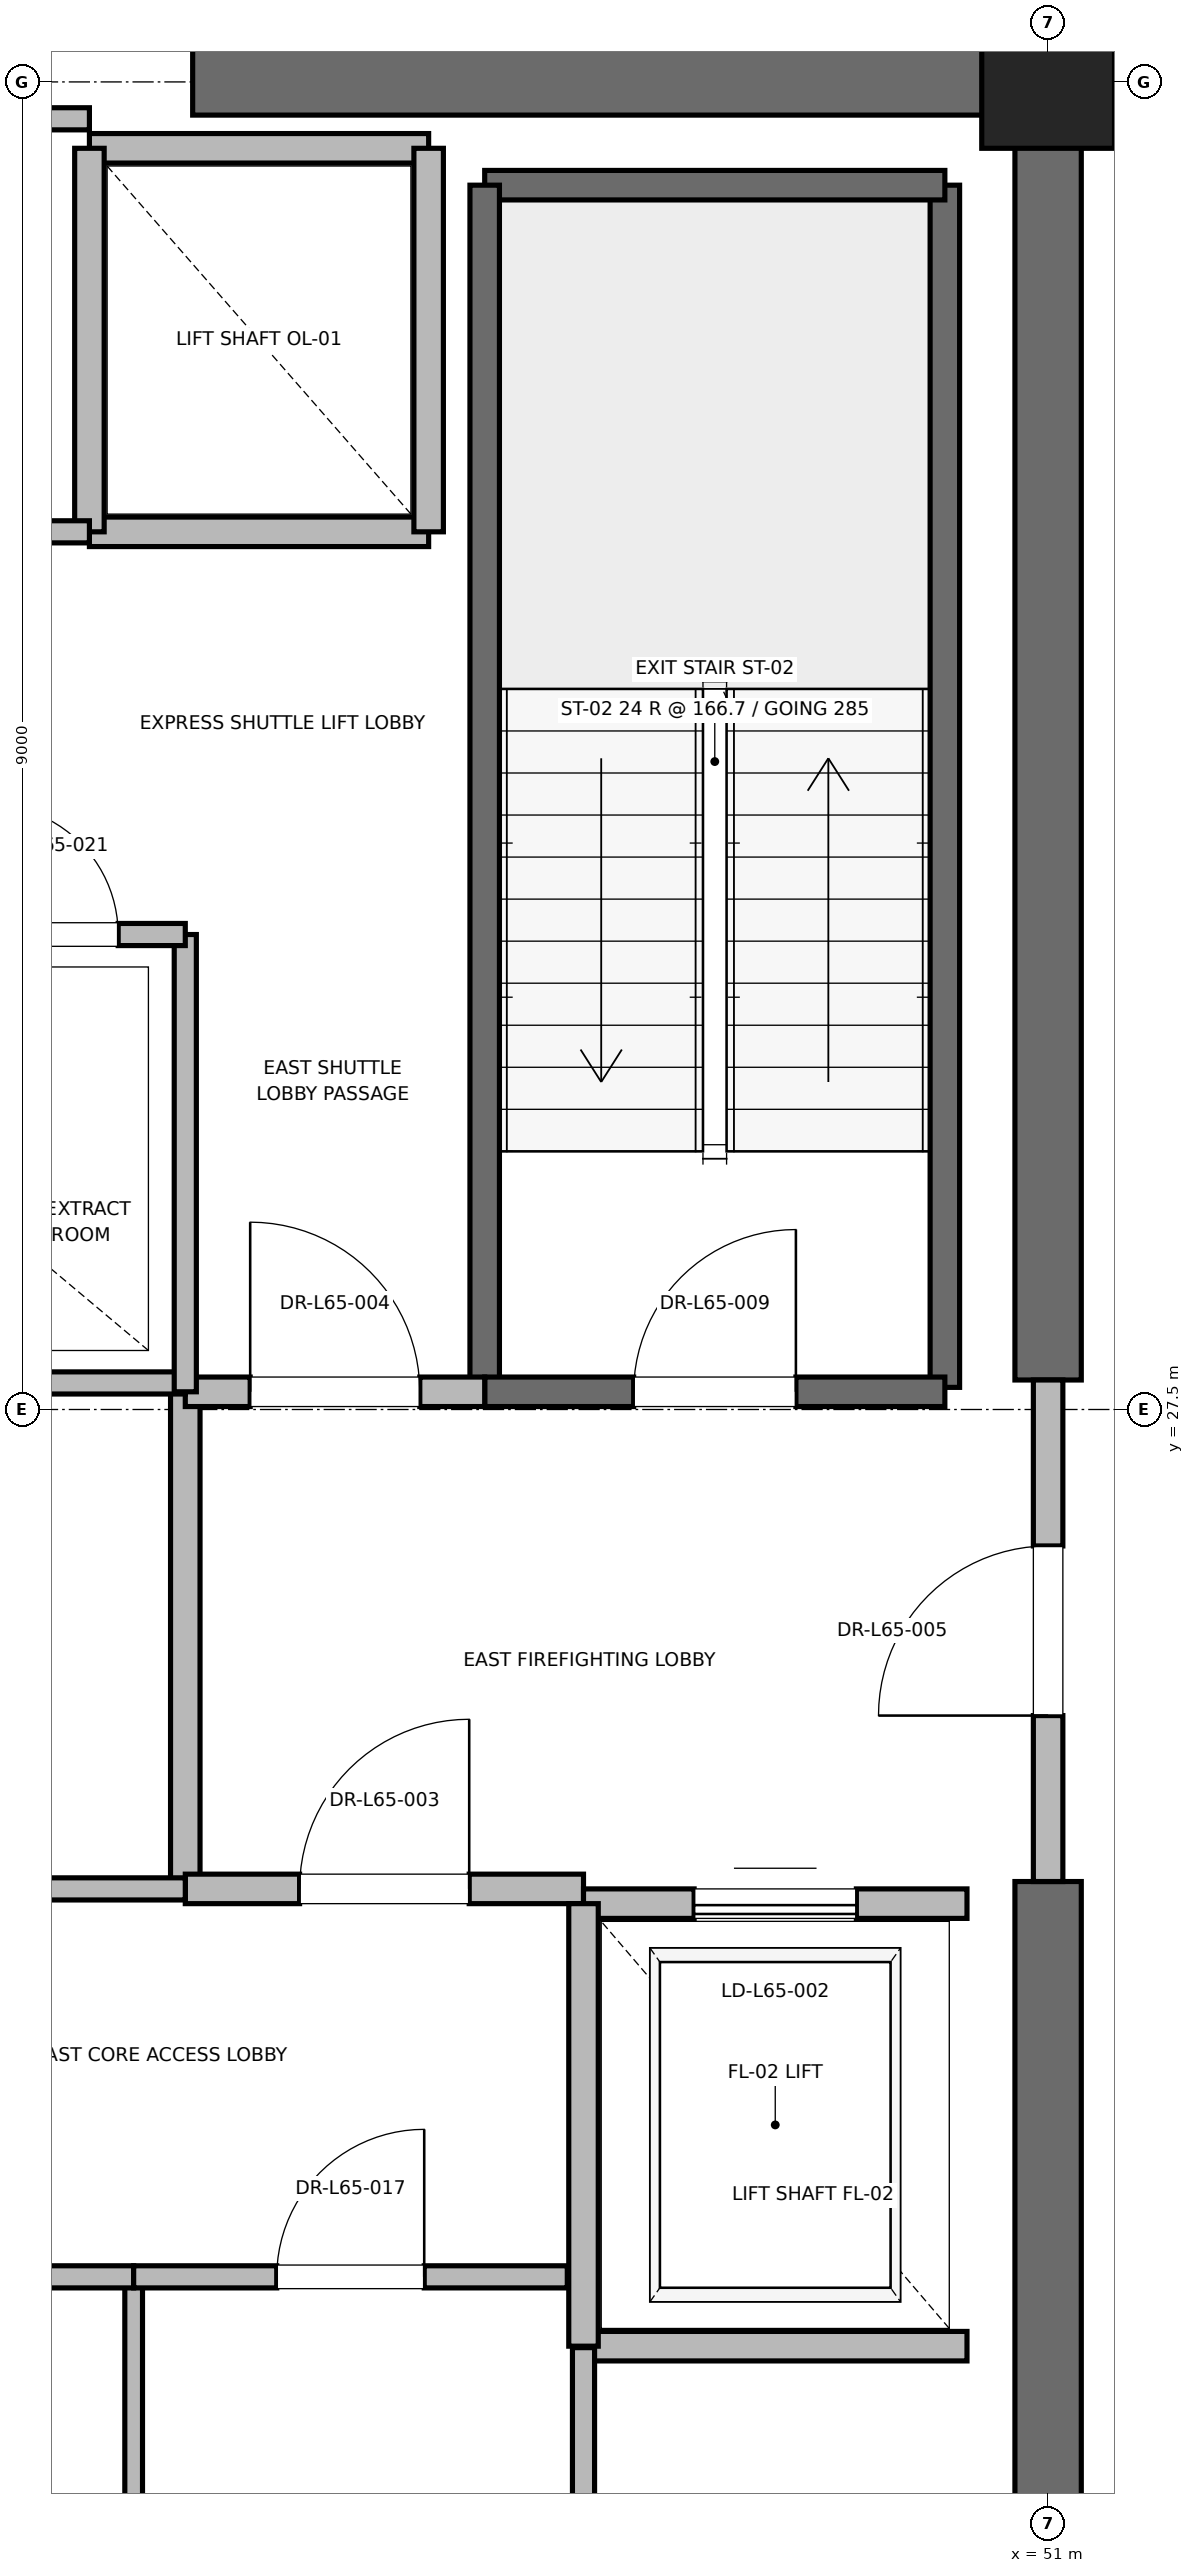
"""IFC4 building model, lengths in metres.
Left out: names, types, materials, properties, quantities, classifications, styles, units other than length and angle.
Written with IfcOpenShell. Run it as: python <this file> out.ifc"""

import sys

from ifc_helpers import new_model, si_unit, direction, frame, frame_2d, origin, origin_2d, place, context, subcontext, project, spatial, rectangle, extrude, element, fill, save


model = new_model("IFC4")
c1 = context("Model", 3, precision=1e-05, world=origin(), true_north=direction((0.0, 1.0)))
c2 = subcontext(c1, "Body", "Model", "MODEL_VIEW")
j1 = project(units=[si_unit("LENGTHUNIT", "METRE"), si_unit("PLANEANGLEUNIT", "RADIAN")], contexts=[c1])
p1 = place(None, origin())
s1 = spatial("IfcSite", under=j1, at=p1, CompositionType="ELEMENT")
p2 = place(p1, origin())
s2 = spatial("IfcBuilding", under=s1, at=p2, CompositionType="ELEMENT")
p3 = place(p2, frame((0.0, 0.0, 279.2)))
s3 = spatial("IfcBuildingStorey", under=s2, at=p3, CompositionType="ELEMENT", Elevation=279.2)
p4 = place(p3, frame((51.0, 36.5, 0.0), z_axis=(0.0, 0.0, 1.0), x_axis=(1.0, 0.0, 0.0)))
e1 = element("IfcColumn", 1, at=p4, inside=s3, PredefinedType="PILASTER", context=c2, shape_type="SweptSolid", body=[
    extrude(rectangle(XDim=0.9, YDim=0.9, at=origin_2d()), origin(), (0.0, 0.0, 1.0), 4.0),
])
for number, where, z_axis, x_axis in (
    (2, (45.2, 36.5, 0.0), (0.0, 0.0, 1.0), (1.0, 0.0, 0.0)),
    (3, (51.0, 18.5, 0.0), (0.0, 0.0, 1.0), (0.0, 1.0, 0.0)),
):
    element("IfcWall", number, at=place(p3, frame(where, z_axis=z_axis, x_axis=x_axis)), inside=s3, PredefinedType="SHEAR", context=c2, shape_type="SweptSolid", body=[
        extrude(rectangle(XDim=5.8, YDim=0.45, at=frame_2d((2.9, 0.0))), origin(), (0.0, 0.0, 1.0), 3.785),
    ])
p5 = place(p3, frame((51.0, 27.7, 0.0), z_axis=(0.0, 0.0, 1.0), x_axis=(0.0, 1.0, 0.0)))
e4 = element("IfcWall", 4, at=p5, inside=s3, PredefinedType="SHEAR", context=c2, shape_type="SweptSolid", body=[
    extrude(rectangle(XDim=8.8, YDim=0.45, at=frame_2d((4.4, 0.0))), origin(), (0.0, 0.0, 1.0), 3.785),
])
p6 = place(p3, frame((50.3, 27.65, 0.0), z_axis=(0.0, 0.0, 1.0), x_axis=(0.0, 1.0, 0.0)))
e5 = element("IfcWall", 5, at=p6, inside=s3, PredefinedType="SOLIDWALL", context=c2, shape_type="SweptSolid", body=[
    extrude(rectangle(XDim=8.15, YDim=0.2, at=frame_2d((4.075, 0.0))), origin(), (0.0, 0.0, 1.0), 3.785),
])
p7 = place(p3, frame((47.18, 35.8, 0.0), z_axis=(0.0, 0.0, 1.0), x_axis=(1.0, 0.0, 0.0)))
e6 = element("IfcWall", 6, at=p7, inside=s3, PredefinedType="SOLIDWALL", context=c2, shape_type="SweptSolid", body=[
    extrude(rectangle(XDim=3.12, YDim=0.2, at=frame_2d((1.56, 0.0))), origin(), (0.0, 0.0, 1.0), 3.785),
])
p8 = place(p3, frame((47.18, 27.62, 0.0), z_axis=(0.0, 0.0, 1.0), x_axis=(0.0, 1.0, 0.0)))
e7 = element("IfcWall", 7, at=p8, inside=s3, PredefinedType="SOLIDWALL", context=c2, shape_type="SweptSolid", body=[
    extrude(rectangle(XDim=8.18, YDim=0.2, at=frame_2d((4.09, 0.0))), origin(), (0.0, 0.0, 1.0), 3.785),
])
p9 = place(p3, frame((47.18, 27.62, 0.0), z_axis=(0.0, 0.0, 1.0), x_axis=(1.0, 0.0, 0.0)))
e8 = element("IfcWall", 8, at=p9, inside=s3, PredefinedType="SOLIDWALL", context=c2, shape_type="SweptSolid", body=[
    extrude(rectangle(XDim=3.12, YDim=0.2, at=frame_2d((1.56, 0.0))), origin(), (0.0, 0.0, 1.0), 3.785),
])
p10 = place(p9, frame((1.01, 0.0, 0.0)))
e9 = element("IfcOpeningElement", 9, at=p10, cuts=e8, PredefinedType="OPENING", context=c2, shape_type="SweptSolid", body=[
    extrude(rectangle(XDim=1.1, YDim=2.15, at=frame_2d((0.55, 1.075))), frame((0.0, 0.1, 0.0), z_axis=(0.0, -1.0, 0.0), x_axis=(1.0, 0.0, 0.0)), (0.0, 0.0, 1.0), 0.2),
])
p11 = place(p3, frame((45.15, 24.25, 0.0), z_axis=(0.0, 0.0, 1.0), x_axis=(0.0, 1.0, 0.0)))
e10 = element("IfcWall", 10, at=p11, inside=s3, PredefinedType="PARTITIONING", context=c2, shape_type="SweptSolid", body=[
    extrude(rectangle(XDim=3.37, YDim=0.2, at=frame_2d((1.685, 0.0))), origin(), (0.0, 0.0, 1.0), 3.785),
])
p12 = place(p3, frame((45.15, 24.25, 0.0), z_axis=(0.0, 0.0, 1.0), x_axis=(1.0, 0.0, 0.0)))
e11 = element("IfcWall", 11, at=p12, inside=s3, PredefinedType="PARTITIONING", context=c2, shape_type="SweptSolid", body=[
    extrude(rectangle(XDim=2.7, YDim=0.2, at=frame_2d((1.35, 0.0))), origin(), (0.0, 0.0, 1.0), 3.785),
])
p13 = place(p12, frame((0.775, 0.0, 0.0)))
e12 = element("IfcOpeningElement", 12, at=p13, cuts=e11, PredefinedType="OPENING", context=c2, shape_type="SweptSolid", body=[
    extrude(rectangle(XDim=1.15, YDim=2.2, at=frame_2d((0.575, 1.1))), frame((0.0, 0.1, 0.0), z_axis=(0.0, -1.0, 0.0), x_axis=(1.0, 0.0, 0.0)), (0.0, 0.0, 1.0), 0.2),
])
p14 = place(p3, frame((45.15, 27.62, 0.0), z_axis=(0.0, 0.0, 1.0), x_axis=(1.0, 0.0, 0.0)))
e13 = element("IfcWall", 13, at=p14, inside=s3, PredefinedType="PARTITIONING", context=c2, shape_type="SweptSolid", body=[
    extrude(rectangle(XDim=2.03, YDim=0.2, at=frame_2d((1.015, 0.0))), origin(), (0.0, 0.0, 1.0), 3.785),
])
p15 = place(p14, frame((0.44, 0.0, 0.0)))
e14 = element("IfcOpeningElement", 14, at=p15, cuts=e13, PredefinedType="OPENING", context=c2, shape_type="SweptSolid", body=[
    extrude(rectangle(XDim=1.15, YDim=2.2, at=frame_2d((0.575, 1.1))), frame((0.0, 0.1, 0.0), z_axis=(0.0, -1.0, 0.0), x_axis=(1.0, 0.0, 0.0)), (0.0, 0.0, 1.0), 0.2),
])
p16 = place(p3, frame((51.0, 24.3, 0.0), z_axis=(0.0, 0.0, 1.0), x_axis=(0.0, 1.0, 0.0)))
e15 = element("IfcWall", 15, at=p16, inside=s3, PredefinedType="PARTITIONING", context=c2, shape_type="SweptSolid", body=[
    extrude(rectangle(XDim=3.4, YDim=0.2, at=frame_2d((1.7, 0.0))), origin(), (0.0, 0.0, 1.0), 2.865),
])
p17 = place(p16, frame((1.125, 0.0, 0.0)))
e16 = element("IfcOpeningElement", 16, at=p17, cuts=e15, PredefinedType="OPENING", context=c2, shape_type="SweptSolid", body=[
    extrude(rectangle(XDim=1.15, YDim=2.2, at=frame_2d((0.575, 1.1))), frame((0.0, 0.1, 0.0), z_axis=(0.0, -1.0, 0.0), x_axis=(1.0, 0.0, 0.0)), (0.0, 0.0, 1.0), 0.2),
])
p18 = place(p3, frame((47.85, 21.15, 0.0), z_axis=(0.0, 0.0, 1.0), x_axis=(1.0, 0.0, 0.0)))
e17 = element("IfcWall", 17, at=p18, inside=s3, PredefinedType="SOLIDWALL", context=c2, shape_type="SweptSolid", body=[
    extrude(rectangle(XDim=2.6, YDim=0.2, at=frame_2d((1.3, 0.0))), origin(), (0.0, 0.0, 1.0), 3.785),
])
p19 = place(p3, frame((50.45, 24.15, 0.0), z_axis=(0.0, 0.0, 1.0), x_axis=(-1.0, 0.0, 0.0)))
e18 = element("IfcWall", 18, at=p19, inside=s3, PredefinedType="SOLIDWALL", context=c2, shape_type="SweptSolid", body=[
    extrude(rectangle(XDim=2.6, YDim=0.2, at=frame_2d((1.3, 0.0))), origin(), (0.0, 0.0, 1.0), 2.865),
])
p20 = place(p19, frame((0.75, 0.0, 0.0)))
e19 = element("IfcOpeningElement", 19, at=p20, cuts=e18, PredefinedType="OPENING", context=c2, shape_type="SweptSolid", body=[
    extrude(rectangle(XDim=1.1, YDim=2.2, at=frame_2d((0.55, 1.1))), frame((0.0, 0.1, 0.0), z_axis=(0.0, -1.0, 0.0), x_axis=(1.0, 0.0, 0.0)), (0.0, 0.0, 1.0), 0.2),
])
p21 = place(p3, frame((47.85, 24.15, 0.0), z_axis=(0.0, 0.0, 1.0), x_axis=(0.0, -1.0, 0.0)))
e20 = element("IfcWall", 20, at=p21, inside=s3, PredefinedType="SOLIDWALL", context=c2, shape_type="SweptSolid", body=[
    extrude(rectangle(XDim=3.0, YDim=0.2, at=frame_2d((1.5, 0.0))), origin(), (0.0, 0.0, 1.0), 3.785),
])
p22 = place(p3, frame((44.5, 33.45, 0.0), z_axis=(0.0, 0.0, 1.0), x_axis=(1.0, 0.0, 0.0)))
e21 = element("IfcWall", 21, at=p22, inside=s3, PredefinedType="SOLIDWALL", context=c2, shape_type="SweptSolid", body=[
    extrude(rectangle(XDim=2.3, YDim=0.2, at=frame_2d((1.15, 0.0))), origin(), (0.0, 0.0, 1.0), 3.785),
])
p23 = place(p3, frame((46.8, 36.05, 0.0), z_axis=(0.0, 0.0, 1.0), x_axis=(-1.0, 0.0, 0.0)))
e22 = element("IfcWall", 22, at=p23, inside=s3, PredefinedType="SOLIDWALL", context=c2, shape_type="SweptSolid", body=[
    extrude(rectangle(XDim=2.3, YDim=0.2, at=frame_2d((1.15, 0.0))), origin(), (0.0, 0.0, 1.0), 2.865),
])
p24 = place(p3, frame((44.5, 36.05, 0.0), z_axis=(0.0, 0.0, 1.0), x_axis=(0.0, -1.0, 0.0)))
e23 = element("IfcWall", 23, at=p24, inside=s3, PredefinedType="SOLIDWALL", context=c2, shape_type="SweptSolid", body=[
    extrude(rectangle(XDim=2.6, YDim=0.2, at=frame_2d((1.3, 0.0))), origin(), (0.0, 0.0, 1.0), 2.865),
])
p25 = place(p3, frame((46.8, 33.45, 0.0), z_axis=(0.0, 0.0, 1.0), x_axis=(0.0, 1.0, 0.0)))
e24 = element("IfcWall", 24, at=p25, inside=s3, PredefinedType="SOLIDWALL", context=c2, shape_type="SweptSolid", body=[
    extrude(rectangle(XDim=2.6, YDim=0.2, at=frame_2d((1.3, 0.0))), origin(), (0.0, 0.0, 1.0), 3.785),
])
p26 = place(p3, frame((41.56, 27.68, 0.0), z_axis=(0.0, 0.0, 1.0), x_axis=(1.0, 0.0, 0.0)))
e25 = element("IfcWall", 25, at=p26, inside=s3, PredefinedType="PARTITIONING", context=c2, shape_type="SweptSolid", body=[
    extrude(rectangle(XDim=3.59, YDim=0.15, at=frame_2d((1.795, 0.0))), origin(), (0.0, 0.0, 1.0), 2.85),
])
p27 = place(p3, frame((47.85, 18.6, 0.0), z_axis=(0.0, 0.0, 1.0), x_axis=(0.0, 1.0, 0.0)))
e26 = element("IfcWall", 26, at=p27, inside=s3, PredefinedType="PARTITIONING", context=c2, shape_type="SweptSolid", body=[
    extrude(rectangle(XDim=2.54, YDim=0.15, at=frame_2d((1.27, 0.0))), origin(), (0.0, 0.0, 1.0), 2.85),
])
p28 = place(p3, frame((44.8, 18.6, 0.0), z_axis=(0.0, 0.0, 1.0), x_axis=(0.0, 1.0, 0.0)))
e27 = element("IfcWall", 27, at=p28, inside=s3, PredefinedType="PARTITIONING", context=c2, shape_type="SweptSolid", body=[
    extrude(rectangle(XDim=3.02, YDim=0.12, at=frame_2d((1.51, 0.0))), origin(), (0.0, 0.0, 1.0), 2.85),
])
p29 = place(p3, frame((41.76, 21.62, 0.0), z_axis=(0.0, 0.0, 1.0), x_axis=(1.0, 0.0, 0.0)))
e28 = element("IfcWall", 28, at=p29, inside=s3, PredefinedType="PARTITIONING", context=c2, shape_type="SweptSolid", body=[
    extrude(rectangle(XDim=3.04, YDim=0.15, at=frame_2d((1.52, 0.0))), origin(), (0.0, 0.0, 1.0), 2.85),
])
p30 = place(p29, frame((1.02, 0.0, 0.0)))
e29 = element("IfcOpeningElement", 29, at=p30, cuts=e28, PredefinedType="OPENING", context=c2, shape_type="SweptSolid", body=[
    extrude(rectangle(XDim=1.0, YDim=2.15, at=frame_2d((0.5, 1.075))), frame((0.0, 0.075, 0.0), z_axis=(0.0, -1.0, 0.0), x_axis=(1.0, 0.0, 0.0)), (0.0, 0.0, 1.0), 0.15),
])
p31 = place(p3, frame((44.8, 21.62, 0.0), z_axis=(0.0, 0.0, 1.0), x_axis=(1.0, 0.0, 0.0)))
e30 = element("IfcWall", 30, at=p31, inside=s3, PredefinedType="PARTITIONING", context=c2, shape_type="SweptSolid", body=[
    extrude(rectangle(XDim=2.94, YDim=0.15, at=frame_2d((1.47, 0.0))), origin(), (0.0, 0.0, 1.0), 2.85),
])
p32 = place(p31, frame((0.97, 0.0, 0.0)))
e31 = element("IfcOpeningElement", 31, at=p32, cuts=e30, PredefinedType="OPENING", context=c2, shape_type="SweptSolid", body=[
    extrude(rectangle(XDim=1.0, YDim=2.15, at=frame_2d((0.5, 1.075))), frame((0.0, 0.075, 0.0), z_axis=(0.0, -1.0, 0.0), x_axis=(1.0, 0.0, 0.0)), (0.0, 0.0, 1.0), 0.15),
])
p33 = place(p3, frame((41.76, 24.25, 0.0), z_axis=(0.0, 0.0, 1.0), x_axis=(1.0, 0.0, 0.0)))
e32 = element("IfcWall", 32, at=p33, inside=s3, PredefinedType="PARTITIONING", context=c2, shape_type="SweptSolid", body=[
    extrude(rectangle(XDim=3.39, YDim=0.15, at=frame_2d((1.695, 0.0))), origin(), (0.0, 0.0, 1.0), 2.85),
])
p34 = place(p33, frame((1.255, 0.0, 0.0)))
e33 = element("IfcOpeningElement", 33, at=p34, cuts=e32, PredefinedType="OPENING", context=c2, shape_type="SweptSolid", body=[
    extrude(rectangle(XDim=0.88, YDim=2.1, at=frame_2d((0.44, 1.05))), frame((0.0, 0.075, 0.0), z_axis=(0.0, -1.0, 0.0), x_axis=(1.0, 0.0, 0.0)), (0.0, 0.0, 1.0), 0.15),
])
p35 = place(p3, frame((45.15, 27.62, 0.0), z_axis=(0.0, 0.0, 1.0), x_axis=(0.0, 1.0, 0.0)))
e34 = element("IfcWall", 34, at=p35, inside=s3, PredefinedType="PARTITIONING", context=c2, shape_type="SweptSolid", body=[
    extrude(rectangle(XDim=3.1, YDim=0.15, at=frame_2d((1.55, 0.0))), origin(), (0.0, 0.0, 1.0), 2.85),
])
p36 = place(p3, frame((43.36, 30.72, 0.0), z_axis=(0.0, 0.0, 1.0), x_axis=(1.0, 0.0, 0.0)))
e35 = element("IfcWall", 35, at=p36, inside=s3, PredefinedType="PARTITIONING", context=c2, shape_type="SweptSolid", body=[
    extrude(rectangle(XDim=1.79, YDim=0.15, at=frame_2d((0.895, 0.0))), origin(), (0.0, 0.0, 1.0), 2.85),
])
p37 = place(p36, frame((0.455, 0.0, 0.0)))
e36 = element("IfcOpeningElement", 36, at=p37, cuts=e35, PredefinedType="OPENING", context=c2, shape_type="SweptSolid", body=[
    extrude(rectangle(XDim=0.88, YDim=2.1, at=frame_2d((0.44, 1.05))), frame((0.0, 0.075, 0.0), z_axis=(0.0, -1.0, 0.0), x_axis=(1.0, 0.0, 0.0)), (0.0, 0.0, 1.0), 0.15),
])
p38 = place(p3, frame((41.56, 36.25, 0.0), z_axis=(0.0, 0.0, 1.0), x_axis=(1.0, 0.0, 0.0)))
e37 = element("IfcWall", 37, at=p38, inside=s3, PredefinedType="PARTITIONING", context=c2, shape_type="SweptSolid", body=[
    extrude(rectangle(XDim=2.94, YDim=0.15, at=frame_2d((1.47, 0.0))), origin(), (0.0, 0.0, 1.0), 2.85),
])
p39 = place(p3, frame((41.56, 33.45, 0.0), z_axis=(0.0, 0.0, 1.0), x_axis=(1.0, 0.0, 0.0)))
e38 = element("IfcWall", 38, at=p39, inside=s3, PredefinedType="PARTITIONING", context=c2, shape_type="SweptSolid", body=[
    extrude(rectangle(XDim=2.94, YDim=0.15, at=frame_2d((1.47, 0.0))), origin(), (0.0, 0.0, 1.0), 2.85),
])
p40 = place(p39, frame((1.03, 0.0, 0.0)))
e39 = element("IfcOpeningElement", 39, at=p40, cuts=e38, PredefinedType="OPENING", context=c2, shape_type="SweptSolid", body=[
    extrude(rectangle(XDim=0.88, YDim=2.1, at=frame_2d((0.44, 1.05))), frame((0.0, 0.075, 0.0), z_axis=(0.0, -1.0, 0.0), x_axis=(1.0, 0.0, 0.0)), (0.0, 0.0, 1.0), 0.15),
])
p41 = place(p10, origin())
e40 = element("IfcDoor", 40, at=p41, inside=s3, OperationType="SINGLE_SWING_RIGHT", PredefinedType="DOOR", context=c2, shape_type="SweptSolid", body=[
    extrude(rectangle(XDim=1.1, YDim=2.15, at=frame_2d((0.55, 1.075))), frame((0.0, 0.025, 0.0), z_axis=(0.0, -1.0, 0.0), x_axis=(1.0, 0.0, 0.0)), (0.0, 0.0, 1.0), 0.05),
])
fill(e9, e40)
p42 = place(p13, origin())
e41 = element("IfcDoor", 41, at=p42, inside=s3, OperationType="SINGLE_SWING_RIGHT", PredefinedType="DOOR", context=c2, shape_type="SweptSolid", body=[
    extrude(rectangle(XDim=1.15, YDim=2.2, at=frame_2d((0.575, 1.1))), frame((0.0, 0.025, 0.0), z_axis=(0.0, -1.0, 0.0), x_axis=(1.0, 0.0, 0.0)), (0.0, 0.0, 1.0), 0.05),
])
fill(e12, e41)
p43 = place(p15, origin())
e42 = element("IfcDoor", 42, at=p43, inside=s3, OperationType="SINGLE_SWING_LEFT", PredefinedType="DOOR", context=c2, shape_type="SweptSolid", body=[
    extrude(rectangle(XDim=1.15, YDim=2.2, at=frame_2d((0.575, 1.1))), frame((0.0, 0.025, 0.0), z_axis=(0.0, -1.0, 0.0), x_axis=(1.0, 0.0, 0.0)), (0.0, 0.0, 1.0), 0.05),
])
fill(e14, e42)
p44 = place(p17, origin())
e43 = element("IfcDoor", 43, at=p44, inside=s3, OperationType="SINGLE_SWING_LEFT", PredefinedType="DOOR", context=c2, shape_type="SweptSolid", body=[
    extrude(rectangle(XDim=1.15, YDim=2.2, at=frame_2d((0.575, 1.1))), frame((0.0, 0.025, 0.0), z_axis=(0.0, -1.0, 0.0), x_axis=(1.0, 0.0, 0.0)), (0.0, 0.0, 1.0), 0.05),
])
fill(e16, e43)
p45 = place(p20, origin())
e44 = element("IfcDoor", 44, at=p45, inside=s3, OperationType="SLIDING_TO_RIGHT", PredefinedType="DOOR", context=c2, shape_type="SweptSolid", body=[
    extrude(rectangle(XDim=1.1, YDim=2.2, at=frame_2d((0.55, 1.1))), frame((0.0, 0.025, 0.0), z_axis=(0.0, -1.0, 0.0), x_axis=(1.0, 0.0, 0.0)), (0.0, 0.0, 1.0), 0.05),
])
fill(e19, e44)
p46 = place(p32, origin())
e45 = element("IfcDoor", 45, at=p46, inside=s3, OperationType="SINGLE_SWING_RIGHT", PredefinedType="DOOR", context=c2, shape_type="SweptSolid", body=[
    extrude(rectangle(XDim=1.0, YDim=2.15, at=frame_2d((0.5, 1.075))), frame((0.0, 0.025, 0.0), z_axis=(0.0, -1.0, 0.0), x_axis=(1.0, 0.0, 0.0)), (0.0, 0.0, 1.0), 0.05),
])
fill(e31, e45)
p47 = place(p37, origin())
e46 = element("IfcDoor", 46, at=p47, inside=s3, OperationType="SINGLE_SWING_LEFT", PredefinedType="DOOR", context=c2, shape_type="SweptSolid", body=[
    extrude(rectangle(XDim=0.88, YDim=2.1, at=frame_2d((0.44, 1.05))), frame((0.0, 0.025, 0.0), z_axis=(0.0, -1.0, 0.0), x_axis=(1.0, 0.0, 0.0)), (0.0, 0.0, 1.0), 0.05),
])
fill(e36, e46)
save(model, sys.argv[1])
